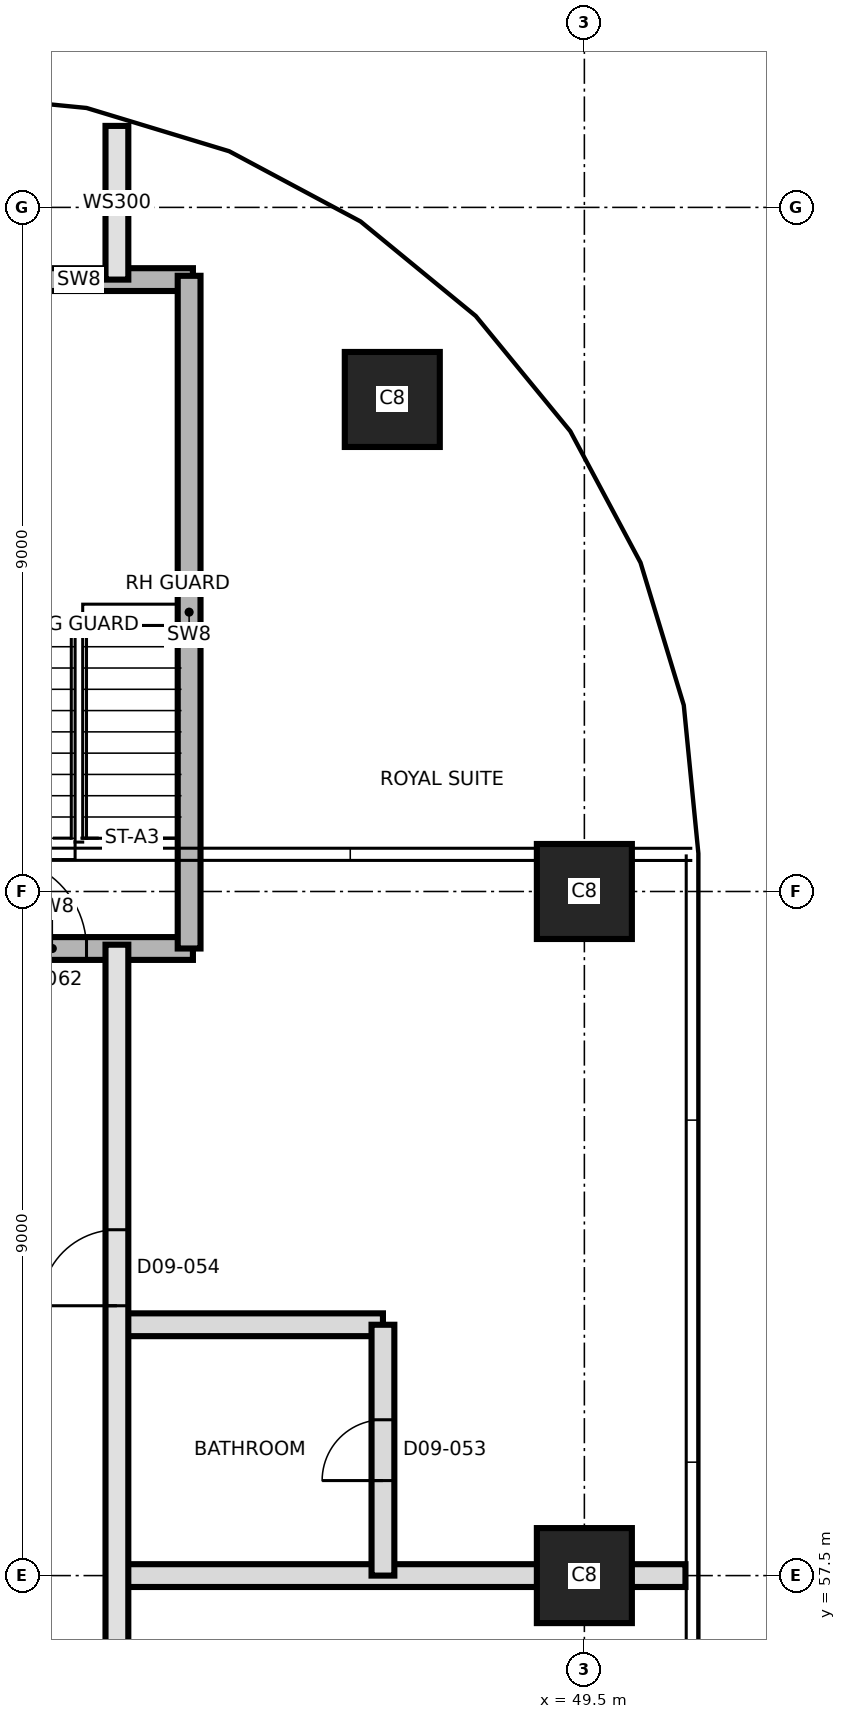
"""IFC4 building model, lengths in metres.
Left out: names, types, materials, properties, quantities, classifications, styles, units other than length and angle.
Written with IfcOpenShell. Run it as: python <this file> out.ifc"""

import sys

from ifc_helpers import new_model, si_unit, direction, frame, frame_2d, origin, origin_2d, place, context, subcontext, project, spatial, rectangle, extrude, element, fill, save


model = new_model("IFC4")
c1 = context("Model", 3, precision=1e-05, world=origin(), true_north=direction((0.0, 1.0)))
c2 = subcontext(c1, "Body", "Model", "MODEL_VIEW")
j1 = project(units=[si_unit("LENGTHUNIT", "METRE"), si_unit("PLANEANGLEUNIT", "RADIAN")], contexts=[c1])
p1 = place(None, origin())
s1 = spatial("IfcSite", under=j1, at=p1, CompositionType="ELEMENT")
p2 = place(p1, origin())
s2 = spatial("IfcBuilding", under=s1, at=p2, CompositionType="ELEMENT")
p3 = place(p2, frame((0.0, 0.0, 113.0)))
s3 = spatial("IfcBuildingStorey", under=s2, at=p3, CompositionType="ELEMENT", Elevation=113.0)
for number, where, z_axis, x_axis in (
    (1, (49.5, 57.5, 0.0), (0.0, 0.0, 1.0), (1.0, 0.0, 0.0)),
    (2, (49.5, 66.5, 0.0), (0.0, 0.0, 1.0), (1.0, 0.0, 0.0)),
    (3, (46.973, 72.973, 0.0), (0.0, 0.0, 1.0), (1.0, 0.0, 0.0)),
):
    element("IfcColumn", number, at=place(p3, frame(where, z_axis=z_axis, x_axis=x_axis)), inside=s3, PredefinedType="COLUMN", context=c2, shape_type="SweptSolid", body=[
        extrude(rectangle(XDim=1.25, YDim=1.25, at=origin_2d()), origin(), (0.0, 0.0, 1.0), 3.7),
    ])
p4 = place(p3, frame((43.35, 57.5, 0.0), z_axis=(0.0, 0.0, 1.0), x_axis=(1.0, 0.0, 0.0)))
e4 = element("IfcWall", 4, at=p4, inside=s3, PredefinedType="PARTITIONING", context=c2, shape_type="SweptSolid", body=[
    extrude(rectangle(XDim=7.48, YDim=0.3, at=frame_2d((3.74, 0.0))), origin(), (0.0, 0.0, 1.0), 3.4),
])
p5 = place(p3, frame((43.35, 60.8, 0.0), z_axis=(0.0, 0.0, 1.0), x_axis=(1.0, 0.0, 0.0)))
e5 = element("IfcWall", 5, at=p5, inside=s3, PredefinedType="PARTITIONING", context=c2, shape_type="SweptSolid", body=[
    extrude(rectangle(XDim=3.5, YDim=0.3, at=frame_2d((1.75, 0.0))), origin(), (0.0, 0.0, 1.0), 3.4),
])
p6 = place(p3, frame((40.65, 65.75, 0.0), z_axis=(0.0, 0.0, 1.0), x_axis=(1.0, 0.0, 0.0)))
e6 = element("IfcWall", 6, at=p6, inside=s3, PredefinedType="SHEAR", context=c2, shape_type="SweptSolid", body=[
    extrude(rectangle(XDim=3.7, YDim=0.3, at=frame_2d((1.85, 0.0))), origin(), (0.0, 0.0, 1.0), 3.4),
])
p7 = place(p6, frame((1.1, 0.0, 0.0)))
e7 = element("IfcOpeningElement", 7, at=p7, cuts=e6, PredefinedType="OPENING", context=c2, shape_type="SweptSolid", body=[
    extrude(rectangle(XDim=1.2, YDim=2.1, at=frame_2d((0.6, 1.05))), frame((0.0, 0.16, 0.0), z_axis=(0.0, -1.0, 0.0), x_axis=(1.0, 0.0, 0.0)), (0.0, 0.0, 1.0), 0.32),
])
p8 = place(p3, frame((41.35, 74.55, 0.0), z_axis=(0.0, 0.0, 1.0), x_axis=(1.0, 0.0, 0.0)))
e8 = element("IfcWall", 8, at=p8, inside=s3, PredefinedType="SHEAR", context=c2, shape_type="SweptSolid", body=[
    extrude(rectangle(XDim=3.0, YDim=0.3, at=frame_2d((1.5, 0.0))), origin(), (0.0, 0.0, 1.0), 3.4),
])
p9 = place(p3, frame((43.35, 39.8, 0.0), z_axis=(0.0, 0.0, 1.0), x_axis=(0.0, 1.0, 0.0)))
e9 = element("IfcWall", 9, at=p9, inside=s3, PredefinedType="SOLIDWALL", context=c2, shape_type="SweptSolid", body=[
    extrude(rectangle(XDim=26.0, YDim=0.3, at=frame_2d((13.0, 0.0))), origin(), (0.0, 0.0, 1.0), 3.4),
])
p10 = place(p9, frame((2.05, 0.0, 0.0)))
e10 = element("IfcOpeningElement", 10, at=p10, cuts=e9, PredefinedType="OPENING", context=c2, shape_type="SweptSolid", body=[
    extrude(rectangle(XDim=1.0, YDim=2.4, at=frame_2d((0.5, 1.2))), frame((0.0, 0.16, 0.0), z_axis=(0.0, -1.0, 0.0), x_axis=(1.0, 0.0, 0.0)), (0.0, 0.0, 1.0), 0.32),
])
p11 = place(p9, frame((14.35, 0.0, 0.0)))
e11 = element("IfcOpeningElement", 11, at=p11, cuts=e9, PredefinedType="OPENING", context=c2, shape_type="SweptSolid", body=[
    extrude(rectangle(XDim=1.0, YDim=2.4, at=frame_2d((0.5, 1.2))), frame((0.0, 0.16, 0.0), z_axis=(0.0, -1.0, 0.0), x_axis=(1.0, 0.0, 0.0)), (0.0, 0.0, 1.0), 0.32),
])
p12 = place(p9, frame((21.25, 0.0, 0.0)))
e12 = element("IfcOpeningElement", 12, at=p12, cuts=e9, PredefinedType="OPENING", context=c2, shape_type="SweptSolid", body=[
    extrude(rectangle(XDim=1.0, YDim=2.4, at=frame_2d((0.5, 1.2))), frame((0.0, 0.16, 0.0), z_axis=(0.0, -1.0, 0.0), x_axis=(1.0, 0.0, 0.0)), (0.0, 0.0, 1.0), 0.32),
])
p13 = place(p3, frame((43.35, 74.55, 0.0), z_axis=(0.0, 0.0, 1.0), x_axis=(0.0, 1.0, 0.0)))
e13 = element("IfcWall", 13, at=p13, inside=s3, PredefinedType="SOLIDWALL", context=c2, shape_type="SweptSolid", body=[
    extrude(rectangle(XDim=2.022, YDim=0.3, at=frame_2d((1.011, 0.0))), origin(), (0.0, 0.0, 1.0), 3.4),
])
p14 = place(p3, frame((44.3, 65.75, 0.0), z_axis=(0.0, 0.0, 1.0), x_axis=(0.0, 1.0, 0.0)))
e14 = element("IfcWall", 14, at=p14, inside=s3, PredefinedType="SHEAR", context=c2, shape_type="SweptSolid", body=[
    extrude(rectangle(XDim=8.85, YDim=0.3, at=frame_2d((4.425, 0.0))), origin(), (0.0, 0.0, 1.0), 3.4),
])
p15 = place(p3, frame((46.85, 57.5, 0.0), z_axis=(0.0, 0.0, 1.0), x_axis=(0.0, 1.0, 0.0)))
e15 = element("IfcWall", 15, at=p15, inside=s3, PredefinedType="PARTITIONING", context=c2, shape_type="SweptSolid", body=[
    extrude(rectangle(XDim=3.3, YDim=0.3, at=frame_2d((1.65, 0.0))), origin(), (0.0, 0.0, 1.0), 3.4),
])
p16 = place(p15, frame((1.25, 0.0, 0.0)))
e16 = element("IfcOpeningElement", 16, at=p16, cuts=e15, PredefinedType="OPENING", context=c2, shape_type="SweptSolid", body=[
    extrude(rectangle(XDim=0.8, YDim=2.1, at=frame_2d((0.4, 1.05))), frame((0.0, 0.16, 0.0), z_axis=(0.0, -1.0, 0.0), x_axis=(1.0, 0.0, 0.0)), (0.0, 0.0, 1.0), 0.32),
])
p17 = place(p16, origin())
e17 = element("IfcDoor", 17, at=p17, inside=s3, OperationType="SINGLE_SWING_LEFT", PredefinedType="DOOR", context=c2, shape_type="SweptSolid", body=[
    extrude(rectangle(XDim=0.8, YDim=2.1, at=frame_2d((0.4, 1.05))), frame((0.0, 0.025, 0.0), z_axis=(0.0, -1.0, 0.0), x_axis=(1.0, 0.0, 0.0)), (0.0, 0.0, 1.0), 0.05),
])
fill(e16, e17)
p18 = place(p12, origin())
e18 = element("IfcDoor", 18, at=p18, inside=s3, OperationType="SINGLE_SWING_RIGHT", PredefinedType="DOOR", context=c2, shape_type="SweptSolid", body=[
    extrude(rectangle(XDim=1.0, YDim=2.4, at=frame_2d((0.5, 1.2))), frame((0.0, 0.025, 0.0), z_axis=(0.0, -1.0, 0.0), x_axis=(1.0, 0.0, 0.0)), (0.0, 0.0, 1.0), 0.05),
])
fill(e12, e18)
p19 = place(p7, origin())
e19 = element("IfcDoor", 19, at=p19, inside=s3, OperationType="SINGLE_SWING_RIGHT", PredefinedType="DOOR", context=c2, shape_type="SweptSolid", body=[
    extrude(rectangle(XDim=1.2, YDim=2.1, at=frame_2d((0.6, 1.05))), frame((0.0, 0.025, 0.0), z_axis=(0.0, -1.0, 0.0), x_axis=(1.0, 0.0, 0.0)), (0.0, 0.0, 1.0), 0.05),
])
fill(e7, e19)
save(model, sys.argv[1])
